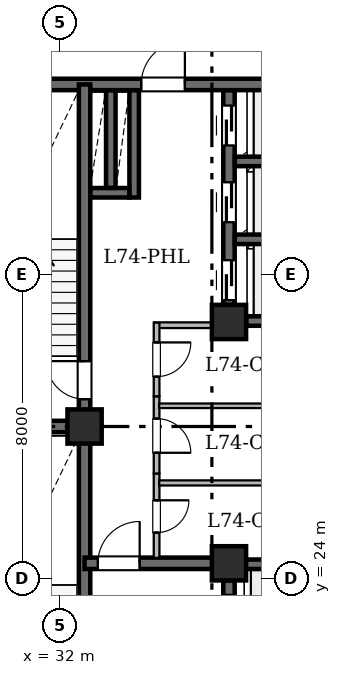
"""IFC4 building model, lengths in metres.
Left out: names, types, materials, properties, quantities, classifications, styles, units other than length and angle.
Written with IfcOpenShell. Run it as: python <this file> out.ifc"""

import sys

from ifc_helpers import new_model, si_unit, direction, frame, frame_2d, origin, origin_2d, place, context, subcontext, project, spatial, rectangle, hollow_rectangle, extrude, element, fill, save


model = new_model("IFC4")
c1 = context("Model", 3, precision=1e-05, world=origin(), true_north=direction((0.0, 1.0)))
c2 = subcontext(c1, "Body", "Model", "MODEL_VIEW")
j1 = project(units=[si_unit("LENGTHUNIT", "METRE"), si_unit("PLANEANGLEUNIT", "RADIAN")], contexts=[c1])
p1 = place(None, origin())
s1 = spatial("IfcSite", under=j1, at=p1, CompositionType="ELEMENT")
p2 = place(p1, origin())
s2 = spatial("IfcBuilding", under=s1, at=p2, CompositionType="ELEMENT")
p3 = place(p2, frame((0.0, 0.0, 290.45)))
s3 = spatial("IfcBuildingStorey", under=s2, at=p3, CompositionType="ELEMENT", Elevation=290.45)
for number, where, z_axis, x_axis in (
    (1, (32.65, 28.0, 0.0), (0.0, 0.0, 1.0), (1.0, 0.0, 0.0)),
    (2, (36.45, 24.4, 0.0), (0.0, 0.0, 1.0), (1.0, 0.0, 0.0)),
    (3, (36.45, 30.75, 0.0), (0.0, 0.0, 1.0), (1.0, 0.0, 0.0)),
):
    element("IfcColumn", number, at=place(p3, frame(where, z_axis=z_axis, x_axis=x_axis)), inside=s3, PredefinedType="COLUMN", context=c2, shape_type="SweptSolid", body=[
        extrude(hollow_rectangle(XDim=0.9, YDim=0.9, WallThickness=0.045, at=origin_2d()), origin(), (0.0, 0.0, 1.0), 4.2),
    ])
p4 = place(p3, frame((29.0, 37.0, 0.0), z_axis=(0.0, 0.0, 1.0), x_axis=(1.0, 0.0, 0.0)))
e4 = element("IfcWall", 4, at=p4, inside=s3, PredefinedType="SHEAR", context=c2, shape_type="SweptSolid", body=[
    extrude(rectangle(XDim=10.4, YDim=0.3, at=frame_2d((5.2, 0.0))), origin(), (0.0, 0.0, 1.0), 3.78),
])
p5 = place(p4, frame((5.14, 0.0, 0.0)))
e5 = element("IfcOpeningElement", 5, at=p5, cuts=e4, PredefinedType="OPENING", context=c2, shape_type="SweptSolid", body=[
    extrude(rectangle(XDim=1.15, YDim=2.2, at=frame_2d((0.575, 1.1))), frame((0.0, 0.16, 0.0), z_axis=(0.0, -1.0, 0.0), x_axis=(1.0, 0.0, 0.0)), (0.0, 0.0, 1.0), 0.32),
])
p6 = place(p3, frame((32.65, 19.0, 0.0), z_axis=(0.0, 0.0, 1.0), x_axis=(0.0, 1.0, 0.0)))
e6 = element("IfcWall", 6, at=p6, inside=s3, PredefinedType="SHEAR", context=c2, shape_type="SweptSolid", body=[
    extrude(rectangle(XDim=9.0, YDim=0.3, at=frame_2d((4.5, 0.0))), origin(), (0.0, 0.0, 1.0), 3.78),
])
p7 = place(p6, frame((0.72, 0.0, 0.0)))
e7 = element("IfcOpeningElement", 7, at=p7, cuts=e6, PredefinedType="OPENING", context=c2, shape_type="SweptSolid", body=[
    extrude(rectangle(XDim=1.0, YDim=2.15, at=frame_2d((0.5, 1.075))), frame((0.0, 0.16, 0.0), z_axis=(0.0, -1.0, 0.0), x_axis=(1.0, 0.0, 0.0)), (0.0, 0.0, 1.0), 0.32),
])
p8 = place(p3, frame((32.65, 28.0, 0.0), z_axis=(0.0, 0.0, 1.0), x_axis=(0.0, 1.0, 0.0)))
e8 = element("IfcWall", 8, at=p8, inside=s3, PredefinedType="SHEAR", context=c2, shape_type="SweptSolid", body=[
    extrude(rectangle(XDim=9.0, YDim=0.3, at=frame_2d((4.5, 0.0))), origin(), (0.0, 0.0, 1.0), 3.78),
])
p9 = place(p8, frame((0.72, 0.0, 0.0)))
e9 = element("IfcOpeningElement", 9, at=p9, cuts=e8, PredefinedType="OPENING", context=c2, shape_type="SweptSolid", body=[
    extrude(rectangle(XDim=1.0, YDim=2.15, at=frame_2d((0.5, 1.075))), frame((0.0, 0.16, 0.0), z_axis=(0.0, -1.0, 0.0), x_axis=(1.0, 0.0, 0.0)), (0.0, 0.0, 1.0), 0.32),
])
p10 = place(p3, frame((29.0, 28.0, 0.0), z_axis=(0.0, 0.0, 1.0), x_axis=(1.0, 0.0, 0.0)))
e10 = element("IfcWall", 10, at=p10, inside=s3, PredefinedType="SHEAR", context=c2, shape_type="SweptSolid", body=[
    extrude(rectangle(XDim=3.65, YDim=0.3, at=frame_2d((1.825, 0.0))), origin(), (0.0, 0.0, 1.0), 3.78),
])
p11 = place(p3, frame((32.65, 24.4, 0.0), z_axis=(0.0, 0.0, 1.0), x_axis=(1.0, 0.0, 0.0)))
e11 = element("IfcWall", 11, at=p11, inside=s3, PredefinedType="SHEAR", context=c2, shape_type="SweptSolid", body=[
    extrude(rectangle(XDim=3.8, YDim=0.3, at=frame_2d((1.9, 0.0))), origin(), (0.0, 0.0, 1.0), 3.78),
])
p12 = place(p11, frame((0.35, 0.0, 0.0)))
e12 = element("IfcOpeningElement", 12, at=p12, cuts=e11, PredefinedType="OPENING", context=c2, shape_type="SweptSolid", body=[
    extrude(rectangle(XDim=1.1, YDim=2.15, at=frame_2d((0.55, 1.075))), frame((0.0, 0.16, 0.0), z_axis=(0.0, -1.0, 0.0), x_axis=(1.0, 0.0, 0.0)), (0.0, 0.0, 1.0), 0.32),
])
p13 = place(p3, frame((36.45, 19.154, 0.0), z_axis=(0.0, 0.0, 1.0), x_axis=(0.0, 1.0, 0.0)))
e13 = element("IfcWall", 13, at=p13, inside=s3, PredefinedType="SHEAR", context=c2, shape_type="SweptSolid", body=[
    extrude(rectangle(XDim=4.796, YDim=0.3, at=frame_2d((2.398, 0.0))), origin(), (0.0, 0.0, 1.0), 3.78),
])
p14 = place(p13, frame((0.696, 0.0, 0.0)))
e14 = element("IfcOpeningElement", 14, at=p14, cuts=e13, PredefinedType="OPENING", context=c2, shape_type="SweptSolid", body=[
    extrude(rectangle(XDim=1.1, YDim=2.15, at=frame_2d((0.55, 1.075))), frame((0.0, 0.16, 0.0), z_axis=(0.0, -1.0, 0.0), x_axis=(1.0, 0.0, 0.0)), (0.0, 0.0, 1.0), 0.32),
])
p15 = place(p13, frame((3.316, 0.0, 0.0)))
e15 = element("IfcOpeningElement", 15, at=p15, cuts=e13, PredefinedType="OPENING", context=c2, shape_type="SweptSolid", body=[
    extrude(rectangle(XDim=1.1, YDim=2.15, at=frame_2d((0.55, 1.075))), frame((0.0, 0.16, 0.0), z_axis=(0.0, -1.0, 0.0), x_axis=(1.0, 0.0, 0.0)), (0.0, 0.0, 1.0), 0.32),
])
p16 = place(p3, frame((36.45, 31.2, 0.0), z_axis=(0.0, 0.0, 1.0), x_axis=(0.0, 1.0, 0.0)))
e16 = element("IfcWall", 16, at=p16, inside=s3, PredefinedType="SHEAR", context=c2, shape_type="SweptSolid", body=[
    extrude(rectangle(XDim=5.646, YDim=0.3, at=frame_2d((2.823, 0.0))), origin(), (0.0, 0.0, 1.0), 3.78),
])
p17 = place(p16, frame((0.125, 0.0, 0.0)))
e17 = element("IfcOpeningElement", 17, at=p17, cuts=e16, PredefinedType="OPENING", context=c2, shape_type="SweptSolid", body=[
    extrude(rectangle(XDim=1.05, YDim=2.15, at=frame_2d((0.525, 1.075))), frame((0.0, 0.16, 0.0), z_axis=(0.0, -1.0, 0.0), x_axis=(1.0, 0.0, 0.0)), (0.0, 0.0, 1.0), 0.32),
])
p18 = place(p16, frame((2.175, 0.0, 0.0)))
e18 = element("IfcOpeningElement", 18, at=p18, cuts=e16, PredefinedType="OPENING", context=c2, shape_type="SweptSolid", body=[
    extrude(rectangle(XDim=1.05, YDim=2.15, at=frame_2d((0.525, 1.075))), frame((0.0, 0.16, 0.0), z_axis=(0.0, -1.0, 0.0), x_axis=(1.0, 0.0, 0.0)), (0.0, 0.0, 1.0), 0.32),
])
p19 = place(p16, frame((4.195, 0.0, 0.0)))
e19 = element("IfcOpeningElement", 19, at=p19, cuts=e16, PredefinedType="OPENING", context=c2, shape_type="SweptSolid", body=[
    extrude(rectangle(XDim=1.05, YDim=2.15, at=frame_2d((0.525, 1.075))), frame((0.0, 0.16, 0.0), z_axis=(0.0, -1.0, 0.0), x_axis=(1.0, 0.0, 0.0)), (0.0, 0.0, 1.0), 0.32),
])
p20 = place(p3, frame((36.604, 24.375, 0.0), z_axis=(0.0, 0.0, 1.0), x_axis=(1.0, 0.0, 0.0)))
e20 = element("IfcWall", 20, at=p20, inside=s3, PredefinedType="SHEAR", context=c2, shape_type="SweptSolid", body=[
    extrude(rectangle(XDim=2.642, YDim=0.25, at=frame_2d((1.321, 0.0))), origin(), (0.0, 0.0, 1.0), 3.78),
])
p21 = place(p3, frame((36.904, 30.775, 0.0), z_axis=(0.0, 0.0, 1.0), x_axis=(1.0, 0.0, 0.0)))
e21 = element("IfcWall", 21, at=p21, inside=s3, PredefinedType="SHEAR", context=c2, shape_type="SweptSolid", body=[
    extrude(rectangle(XDim=2.342, YDim=0.25, at=frame_2d((1.171, 0.0))), origin(), (0.0, 0.0, 1.0), 3.78),
])
for number, where, z_axis, x_axis in (
    (22, (36.604, 32.925, 0.0), (0.0, 0.0, 1.0), (1.0, 0.0, 0.0)),
    (23, (36.604, 34.975, 0.0), (0.0, 0.0, 1.0), (1.0, 0.0, 0.0)),
):
    element("IfcWall", number, at=place(p3, frame(where, z_axis=z_axis, x_axis=x_axis)), inside=s3, PredefinedType="SHEAR", context=c2, shape_type="SweptSolid", body=[
        extrude(rectangle(XDim=2.642, YDim=0.25, at=frame_2d((1.321, 0.0))), origin(), (0.0, 0.0, 1.0), 3.78),
    ])
p22 = place(p3, frame((33.955, 34.025, 0.0), z_axis=(0.0, 0.0, 1.0), x_axis=(0.0, 1.0, 0.0)))
e24 = element("IfcWall", 24, at=p22, inside=s3, PredefinedType="SHEAR", context=c2, shape_type="SweptSolid", body=[
    extrude(rectangle(XDim=2.821, YDim=0.25, at=frame_2d((1.411, 0.0))), origin(), (0.0, 0.0, 1.0), 3.78),
])
p23 = place(p3, frame((32.804, 34.15, 0.0), z_axis=(0.0, 0.0, 1.0), x_axis=(1.0, 0.0, 0.0)))
e25 = element("IfcWall", 25, at=p23, inside=s3, PredefinedType="SHEAR", context=c2, shape_type="SweptSolid", body=[
    extrude(rectangle(XDim=1.022, YDim=0.25, at=frame_2d((0.511, 0.0))), origin(), (0.0, 0.0, 1.0), 3.78),
])
p24 = place(p3, frame((33.34, 34.279, 0.0), z_axis=(0.0, 0.0, 1.0), x_axis=(0.0, 1.0, 0.0)))
e26 = element("IfcWall", 26, at=p24, inside=s3, PredefinedType="SHEAR", context=c2, shape_type="SweptSolid", body=[
    extrude(rectangle(XDim=2.567, YDim=0.25, at=frame_2d((1.283, 0.0))), origin(), (0.0, 0.0, 1.0), 3.78),
])
p25 = place(p3, frame((34.545, 26.764, 0.0), z_axis=(0.0, 0.0, 1.0), x_axis=(0.0, -1.0, 0.0)))
e27 = element("IfcWall", 27, at=p25, inside=s3, PredefinedType="STANDARD", context=c2, shape_type="SweptSolid", body=[
    extrude(rectangle(XDim=2.22, YDim=0.15, at=frame_2d((1.11, 0.0))), origin(), (0.0, 0.0, 1.0), 3.78),
])
p26 = place(p25, frame((0.706, 0.0, 0.0)))
e28 = element("IfcOpeningElement", 28, at=p26, cuts=e27, PredefinedType="OPENING", context=c2, shape_type="SweptSolid", body=[
    extrude(rectangle(XDim=0.85, YDim=2.1, at=frame_2d((0.425, 1.05))), frame((0.0, 0.085, 0.0), z_axis=(0.0, -1.0, 0.0), x_axis=(1.0, 0.0, 0.0)), (0.0, 0.0, 1.0), 0.17),
])
p27 = place(p3, frame((34.545, 28.794, 0.0), z_axis=(0.0, 0.0, 1.0), x_axis=(0.0, -1.0, 0.0)))
e29 = element("IfcWall", 29, at=p27, inside=s3, PredefinedType="STANDARD", context=c2, shape_type="SweptSolid", body=[
    extrude(rectangle(XDim=2.03, YDim=0.15, at=frame_2d((1.015, 0.0))), origin(), (0.0, 0.0, 1.0), 3.78),
])
p28 = place(p27, frame((0.586, 0.0, 0.0)))
e30 = element("IfcOpeningElement", 30, at=p28, cuts=e29, PredefinedType="OPENING", context=c2, shape_type="SweptSolid", body=[
    extrude(rectangle(XDim=0.9, YDim=2.1, at=frame_2d((0.45, 1.05))), frame((0.0, 0.085, 0.0), z_axis=(0.0, -1.0, 0.0), x_axis=(1.0, 0.0, 0.0)), (0.0, 0.0, 1.0), 0.17),
])
p29 = place(p3, frame((36.3, 30.665, 0.0), z_axis=(0.0, 0.0, 1.0), x_axis=(-1.0, 0.0, 0.0)))
e31 = element("IfcWall", 31, at=p29, inside=s3, PredefinedType="STANDARD", context=c2, shape_type="SweptSolid", body=[
    extrude(rectangle(XDim=1.82, YDim=0.15, at=frame_2d((0.91, 0.0))), origin(), (0.0, 0.0, 1.0), 3.78),
])
p30 = place(p3, frame((34.545, 30.73, 0.0), z_axis=(0.0, 0.0, 1.0), x_axis=(0.0, -1.0, 0.0)))
e32 = element("IfcWall", 32, at=p30, inside=s3, PredefinedType="STANDARD", context=c2, shape_type="SweptSolid", body=[
    extrude(rectangle(XDim=1.936, YDim=0.15, at=frame_2d((0.968, 0.0))), origin(), (0.0, 0.0, 1.0), 3.78),
])
p31 = place(p30, frame((0.518, 0.0, 0.0)))
e33 = element("IfcOpeningElement", 33, at=p31, cuts=e32, PredefinedType="OPENING", context=c2, shape_type="SweptSolid", body=[
    extrude(rectangle(XDim=0.9, YDim=2.1, at=frame_2d((0.45, 1.05))), frame((0.0, 0.085, 0.0), z_axis=(0.0, -1.0, 0.0), x_axis=(1.0, 0.0, 0.0)), (0.0, 0.0, 1.0), 0.17),
])
p32 = place(p3, frame((34.612, 26.515, 0.0), z_axis=(0.0, 0.0, 1.0), x_axis=(1.0, 0.0, 0.0)))
e34 = element("IfcWall", 34, at=p32, inside=s3, PredefinedType="PARTITIONING", context=c2, shape_type="SweptSolid", body=[
    extrude(rectangle(XDim=4.644, YDim=0.135, at=frame_2d((2.322, 0.0))), origin(), (0.0, 0.0, 1.0), 3.78),
])
p33 = place(p3, frame((34.612, 28.545, 0.0), z_axis=(0.0, 0.0, 1.0), x_axis=(1.0, 0.0, 0.0)))
e35 = element("IfcWall", 35, at=p33, inside=s3, PredefinedType="PARTITIONING", context=c2, shape_type="SweptSolid", body=[
    extrude(rectangle(XDim=4.644, YDim=0.12, at=frame_2d((2.322, 0.0))), origin(), (0.0, 0.0, 1.0), 3.78),
])
p34 = place(p9, origin())
e36 = element("IfcDoor", 36, at=p34, inside=s3, OperationType="SINGLE_SWING_RIGHT", PredefinedType="DOOR", context=c2, shape_type="SweptSolid", body=[
    extrude(rectangle(XDim=1.0, YDim=2.15, at=frame_2d((0.5, 1.075))), frame((0.0, 0.025, 0.0), z_axis=(0.0, -1.0, 0.0), x_axis=(1.0, 0.0, 0.0)), (0.0, 0.0, 1.0), 0.05),
])
fill(e9, e36)
p35 = place(p12, origin())
e37 = element("IfcDoor", 37, at=p35, inside=s3, OperationType="SINGLE_SWING_RIGHT", PredefinedType="DOOR", context=c2, shape_type="SweptSolid", body=[
    extrude(rectangle(XDim=1.1, YDim=2.15, at=frame_2d((0.55, 1.075))), frame((0.0, 0.025, 0.0), z_axis=(0.0, -1.0, 0.0), x_axis=(1.0, 0.0, 0.0)), (0.0, 0.0, 1.0), 0.05),
])
fill(e12, e37)
p36 = place(p5, origin())
e38 = element("IfcDoor", 38, at=p36, inside=s3, OperationType="SINGLE_SWING_RIGHT", PredefinedType="DOOR", context=c2, shape_type="SweptSolid", body=[
    extrude(rectangle(XDim=1.15, YDim=2.2, at=frame_2d((0.575, 1.1))), frame((0.0, 0.025, 0.0), z_axis=(0.0, -1.0, 0.0), x_axis=(1.0, 0.0, 0.0)), (0.0, 0.0, 1.0), 0.05),
])
fill(e5, e38)
p37 = place(p15, origin())
e39 = element("IfcDoor", 39, at=p37, inside=s3, OperationType="SLIDING_TO_LEFT", PredefinedType="DOOR", context=c2, shape_type="SweptSolid", body=[
    extrude(rectangle(XDim=1.1, YDim=2.15, at=frame_2d((0.55, 1.075))), frame((0.0, 0.025, 0.0), z_axis=(0.0, -1.0, 0.0), x_axis=(1.0, 0.0, 0.0)), (0.0, 0.0, 1.0), 0.05),
])
fill(e15, e39)
p38 = place(p17, origin())
e40 = element("IfcDoor", 40, at=p38, inside=s3, OperationType="SLIDING_TO_LEFT", PredefinedType="DOOR", context=c2, shape_type="SweptSolid", body=[
    extrude(rectangle(XDim=1.05, YDim=2.15, at=frame_2d((0.525, 1.075))), frame((0.0, 0.025, 0.0), z_axis=(0.0, -1.0, 0.0), x_axis=(1.0, 0.0, 0.0)), (0.0, 0.0, 1.0), 0.05),
])
fill(e17, e40)
p39 = place(p18, origin())
e41 = element("IfcDoor", 41, at=p39, inside=s3, OperationType="SLIDING_TO_LEFT", PredefinedType="DOOR", context=c2, shape_type="SweptSolid", body=[
    extrude(rectangle(XDim=1.05, YDim=2.15, at=frame_2d((0.525, 1.075))), frame((0.0, 0.025, 0.0), z_axis=(0.0, -1.0, 0.0), x_axis=(1.0, 0.0, 0.0)), (0.0, 0.0, 1.0), 0.05),
])
fill(e18, e41)
p40 = place(p19, origin())
e42 = element("IfcDoor", 42, at=p40, inside=s3, OperationType="SLIDING_TO_LEFT", PredefinedType="DOOR", context=c2, shape_type="SweptSolid", body=[
    extrude(rectangle(XDim=1.05, YDim=2.15, at=frame_2d((0.525, 1.075))), frame((0.0, 0.025, 0.0), z_axis=(0.0, -1.0, 0.0), x_axis=(1.0, 0.0, 0.0)), (0.0, 0.0, 1.0), 0.05),
])
fill(e19, e42)
p41 = place(p26, origin())
e43 = element("IfcDoor", 43, at=p41, inside=s3, OperationType="SINGLE_SWING_LEFT", PredefinedType="DOOR", context=c2, shape_type="SweptSolid", body=[
    extrude(rectangle(XDim=0.85, YDim=2.1, at=frame_2d((0.425, 1.05))), frame((0.0, 0.025, 0.0), z_axis=(0.0, -1.0, 0.0), x_axis=(1.0, 0.0, 0.0)), (0.0, 0.0, 1.0), 0.05),
])
fill(e28, e43)
p42 = place(p28, origin())
e44 = element("IfcDoor", 44, at=p42, inside=s3, OperationType="SINGLE_SWING_RIGHT", PredefinedType="DOOR", context=c2, shape_type="SweptSolid", body=[
    extrude(rectangle(XDim=0.9, YDim=2.1, at=frame_2d((0.45, 1.05))), frame((0.0, 0.025, 0.0), z_axis=(0.0, -1.0, 0.0), x_axis=(1.0, 0.0, 0.0)), (0.0, 0.0, 1.0), 0.05),
])
fill(e30, e44)
p43 = place(p31, origin())
e45 = element("IfcDoor", 45, at=p43, inside=s3, OperationType="SINGLE_SWING_LEFT", PredefinedType="DOOR", context=c2, shape_type="SweptSolid", body=[
    extrude(rectangle(XDim=0.9, YDim=2.1, at=frame_2d((0.45, 1.05))), frame((0.0, 0.025, 0.0), z_axis=(0.0, -1.0, 0.0), x_axis=(1.0, 0.0, 0.0)), (0.0, 0.0, 1.0), 0.05),
])
fill(e33, e45)
save(model, sys.argv[1])
